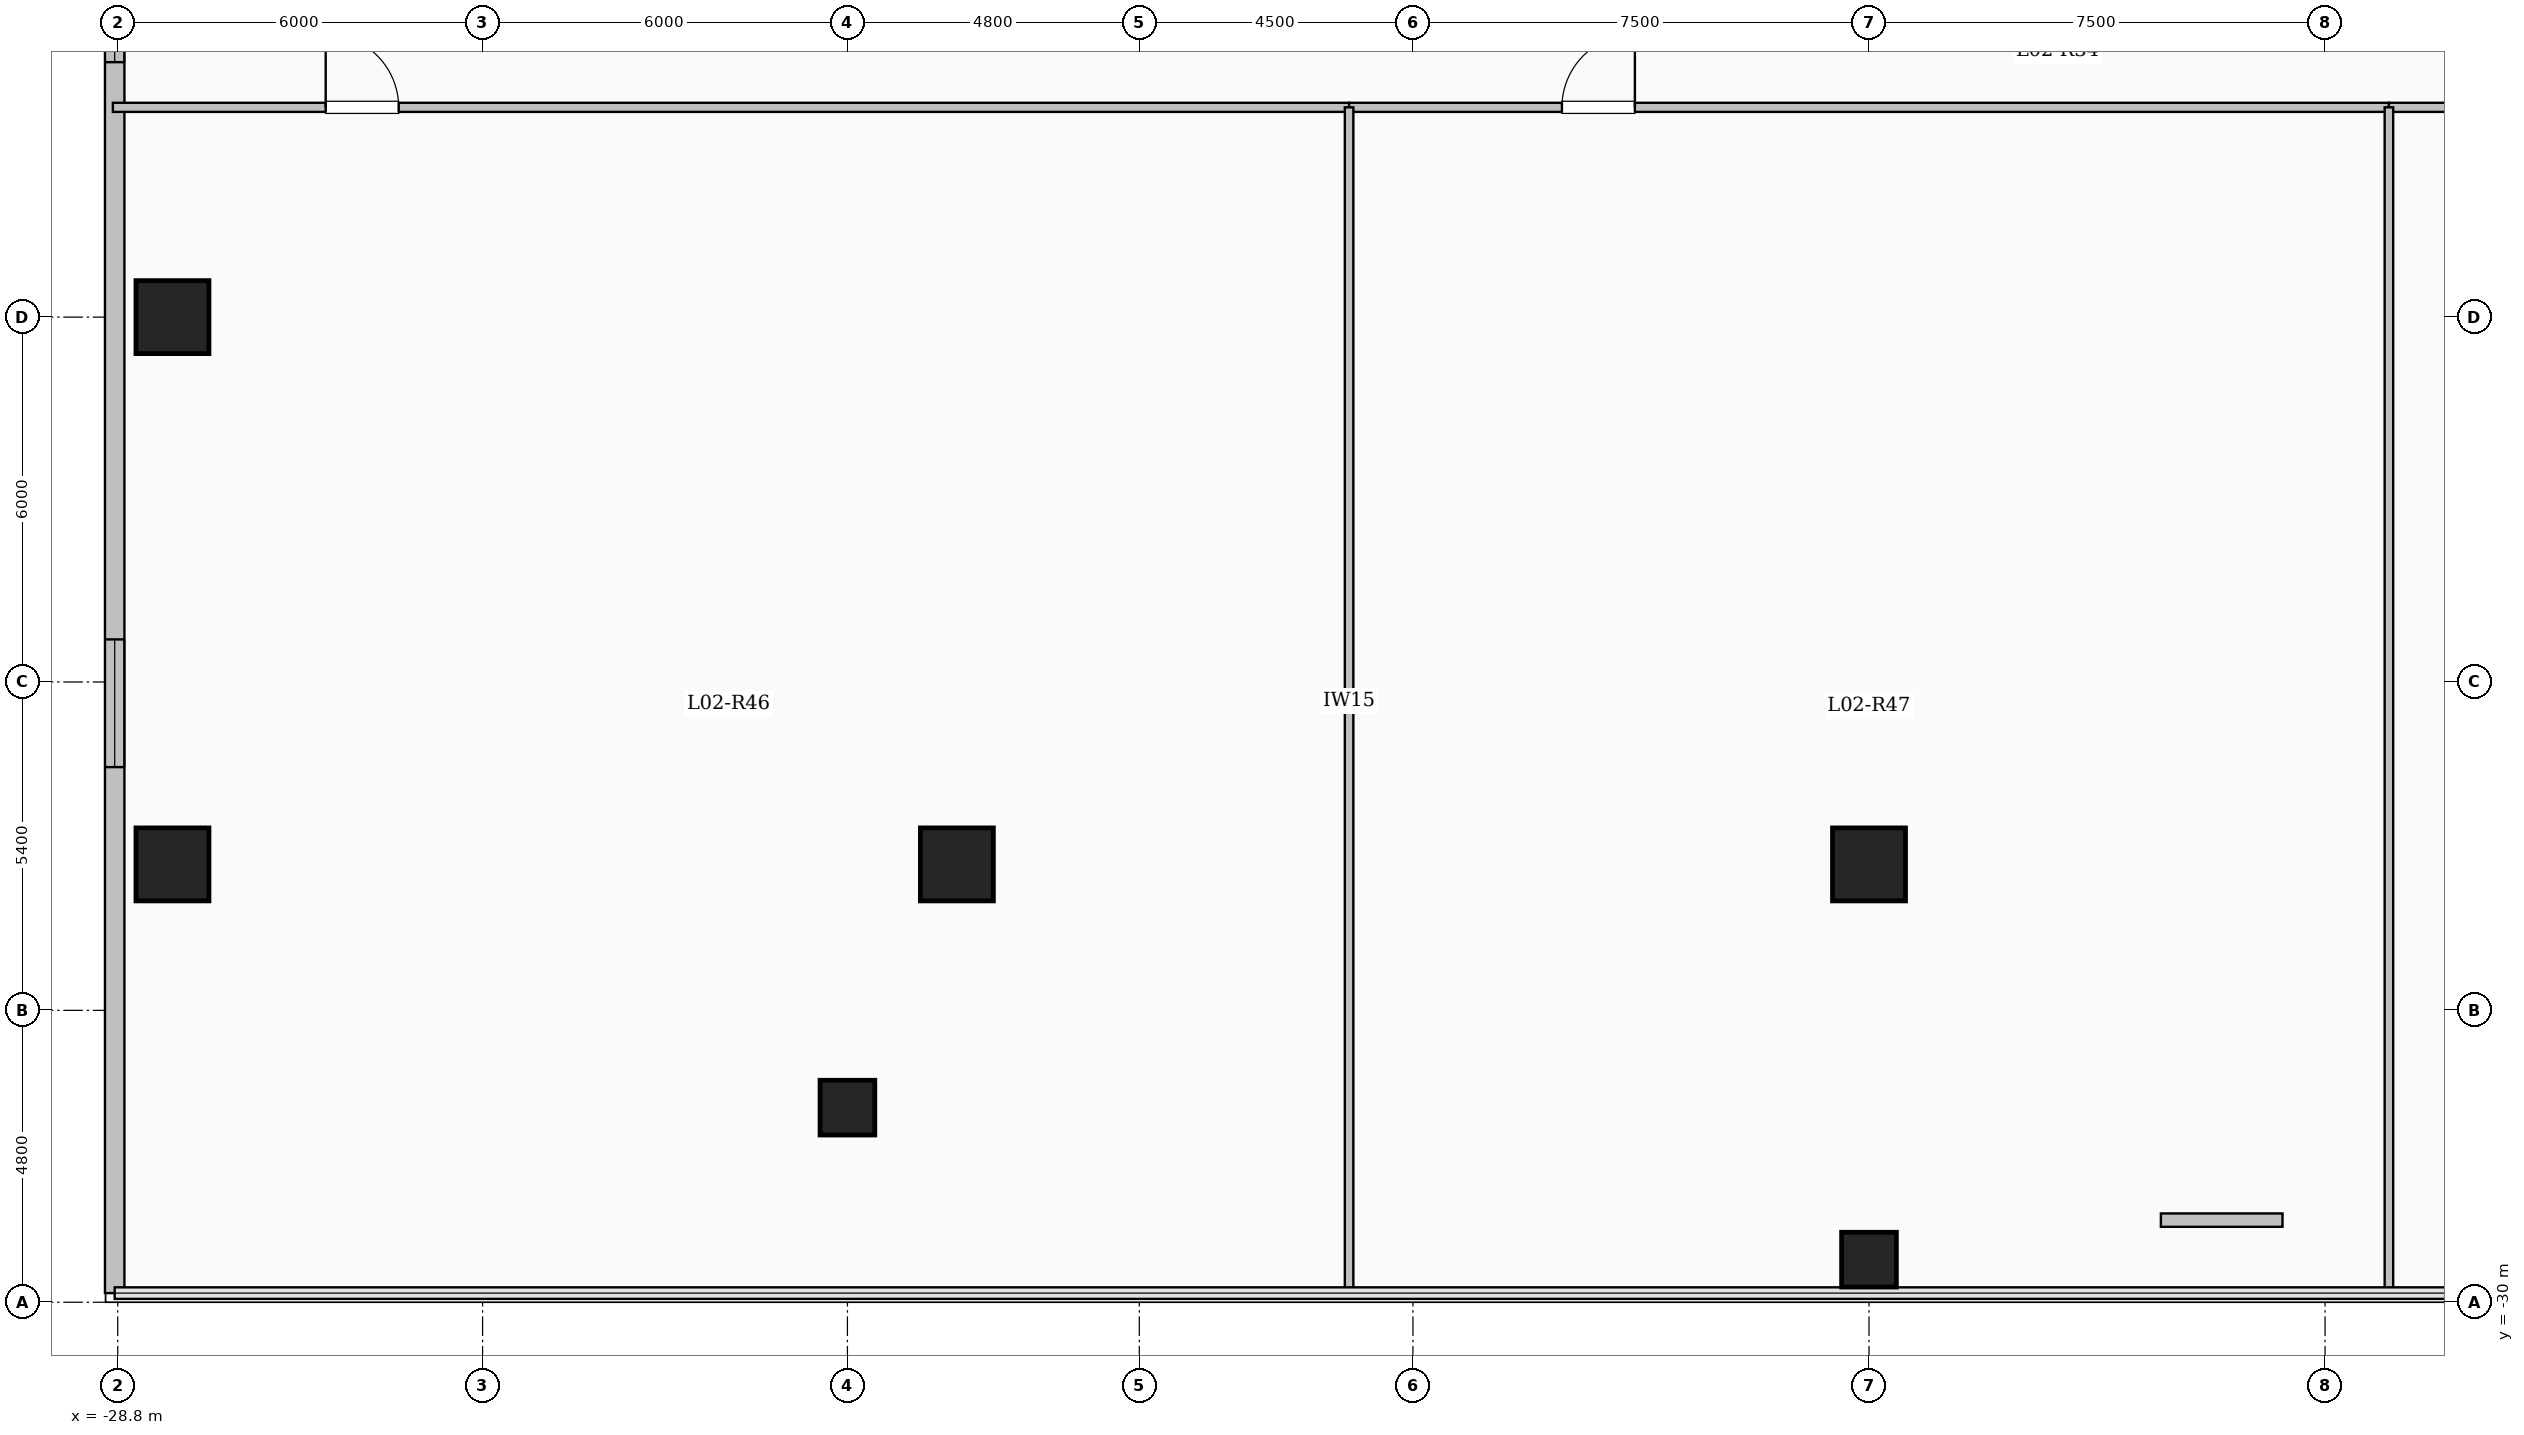
"""IFC4 building model, lengths in metres.
Left out: names, types, materials, properties, quantities, classifications, styles, units other than length and angle.
Written with IfcOpenShell. Run it as: python <this file> out.ifc"""

import sys

from ifc_helpers import new_model, si_unit, direction, frame, frame_2d, origin, origin_2d, place, context, subcontext, project, spatial, rectangle, extrude, element, fill, save


model = new_model("IFC4")
c1 = context("Model", 3, precision=1e-05, world=origin(), true_north=direction((0.0, 1.0)))
c2 = subcontext(c1, "Body", "Model", "MODEL_VIEW")
j1 = project(units=[si_unit("LENGTHUNIT", "METRE"), si_unit("PLANEANGLEUNIT", "RADIAN")], contexts=[c1])
p1 = place(None, origin())
s1 = spatial("IfcSite", under=j1, at=p1, CompositionType="ELEMENT")
p2 = place(p1, origin())
s2 = spatial("IfcBuilding", under=s1, at=p2, CompositionType="ELEMENT")
p3 = place(p2, frame((0.0, 0.0, 9.9)))
s3 = spatial("IfcBuildingStorey", under=s2, at=p3, CompositionType="ELEMENT", Elevation=9.9)
for number, where, z_axis, x_axis in (
    (1, (-16.8, -26.8, 0.0), (0.0, 0.0, 1.0), (1.0, 0.0, 0.0)),
    (2, (0.0, -29.3, 0.0), (0.0, 0.0, 1.0), (1.0, 0.0, 0.0)),
):
    element("IfcColumn", number, at=place(p3, frame(where, z_axis=z_axis, x_axis=x_axis)), inside=s3, PredefinedType="COLUMN", context=c2, shape_type="SweptSolid", body=[
        extrude(rectangle(XDim=0.9, YDim=0.9, at=origin_2d()), origin(), (0.0, 0.0, 1.0), 4.28),
    ])
for number, where, z_axis, x_axis in (
    (3, (-27.9, -22.8, 0.0), (0.0, 0.0, 1.0), (1.0, 0.0, 0.0)),
    (4, (-15.0, -22.8, 0.0), (0.0, 0.0, 1.0), (1.0, 0.0, 0.0)),
    (5, (0.0, -22.8, 0.0), (0.0, 0.0, 1.0), (1.0, 0.0, 0.0)),
    (6, (-27.9, -13.8, 0.0), (0.0, 0.0, 1.0), (1.0, 0.0, 0.0)),
):
    element("IfcColumn", number, at=place(p3, frame(where, z_axis=z_axis, x_axis=x_axis)), inside=s3, PredefinedType="COLUMN", context=c2, shape_type="SweptSolid", body=[
        extrude(rectangle(XDim=1.2, YDim=1.2, at=origin_2d()), origin(), (0.0, 0.0, 1.0), 4.5),
    ])
p4 = place(p3, frame((-28.85, -29.85, 0.0), z_axis=(0.0, 0.0, 1.0), x_axis=(0.0, 1.0, 0.0)))
e7 = element("IfcWall", 7, at=p4, inside=s3, PredefinedType="SOLIDWALL", context=c2, shape_type="SweptSolid", body=[
    extrude(rectangle(XDim=59.7, YDim=0.32, at=frame_2d((29.85, 0.0))), origin(), (0.0, 0.0, 1.0), 4.2),
])
p5 = place(p4, frame((8.65, 0.0, 0.9)))
e8 = element("IfcOpeningElement", 8, at=p5, cuts=e7, PredefinedType="OPENING", context=c2, shape_type="SweptSolid", body=[
    extrude(rectangle(XDim=2.1, YDim=2.0, at=frame_2d((1.05, 1.0))), frame((0.0, 0.17, 0.0), z_axis=(0.0, -1.0, 0.0), x_axis=(1.0, 0.0, 0.0)), (0.0, 0.0, 1.0), 0.34),
])
p6 = place(p4, frame((20.242, 0.0, 0.9)))
e9 = element("IfcOpeningElement", 9, at=p6, cuts=e7, PredefinedType="OPENING", context=c2, shape_type="SweptSolid", body=[
    extrude(rectangle(XDim=1.7, YDim=1.9, at=frame_2d((0.85, 0.95))), frame((0.0, 0.17, 0.0), z_axis=(0.0, -1.0, 0.0), x_axis=(1.0, 0.0, 0.0)), (0.0, 0.0, 1.0), 0.34),
])
p7 = place(p4, frame((30.55, 0.0, 0.9)))
e10 = element("IfcOpeningElement", 10, at=p7, cuts=e7, PredefinedType="OPENING", context=c2, shape_type="SweptSolid", body=[
    extrude(rectangle(XDim=2.1, YDim=2.0, at=frame_2d((1.05, 1.0))), frame((0.0, 0.17, 0.0), z_axis=(0.0, -1.0, 0.0), x_axis=(1.0, 0.0, 0.0)), (0.0, 0.0, 1.0), 0.34),
])
p8 = place(p4, frame((40.975, 0.0, 0.95)))
e11 = element("IfcOpeningElement", 11, at=p8, cuts=e7, PredefinedType="OPENING", context=c2, shape_type="SweptSolid", body=[
    extrude(rectangle(XDim=1.0, YDim=1.5, at=frame_2d((0.5, 0.75))), frame((0.0, 0.17, 0.0), z_axis=(0.0, -1.0, 0.0), x_axis=(1.0, 0.0, 0.0)), (0.0, 0.0, 1.0), 0.34),
])
p9 = place(p4, frame((50.0, 0.0, 0.9)))
e12 = element("IfcOpeningElement", 12, at=p9, cuts=e7, PredefinedType="OPENING", context=c2, shape_type="SweptSolid", body=[
    extrude(rectangle(XDim=2.1, YDim=2.0, at=frame_2d((1.05, 1.0))), frame((0.0, 0.17, 0.0), z_axis=(0.0, -1.0, 0.0), x_axis=(1.0, 0.0, 0.0)), (0.0, 0.0, 1.0), 0.34),
])
p10 = place(p3, frame((4.8, -28.65, 0.0), z_axis=(0.0, 0.0, 1.0), x_axis=(1.0, 0.0, 0.0)))
e13 = element("IfcWall", 13, at=p10, inside=s3, PredefinedType="PARAPET", context=c2, shape_type="SweptSolid", body=[
    extrude(rectangle(XDim=2.0, YDim=0.22, at=frame_2d((1.0, 0.0))), origin(), (0.0, 0.0, 1.0), 0.85),
])
p11 = place(p3, frame((-28.88, -10.35, 0.0), z_axis=(0.0, 0.0, 1.0), x_axis=(1.0, 0.0, 0.0)))
e14 = element("IfcWall", 14, at=p11, inside=s3, PredefinedType="PARTITIONING", context=c2, shape_type="SweptSolid", body=[
    extrude(rectangle(XDim=20.33, YDim=0.15, at=frame_2d((10.165, 0.0))), origin(), (0.0, 0.0, 1.0), 4.2),
])
p12 = place(p11, frame((3.5, 0.0, 0.0)))
e15 = element("IfcOpeningElement", 15, at=p12, cuts=e14, PredefinedType="OPENING", context=c2, shape_type="SweptSolid", body=[
    extrude(rectangle(XDim=1.2, YDim=2.15, at=frame_2d((0.6, 1.075))), frame((0.0, 0.085, 0.0), z_axis=(0.0, -1.0, 0.0), x_axis=(1.0, 0.0, 0.0)), (0.0, 0.0, 1.0), 0.17),
])
p13 = place(p3, frame((-8.55, -10.35, 0.0), z_axis=(0.0, 0.0, 1.0), x_axis=(1.0, 0.0, 0.0)))
e16 = element("IfcWall", 16, at=p13, inside=s3, PredefinedType="PARTITIONING", context=c2, shape_type="SweptSolid", body=[
    extrude(rectangle(XDim=17.1, YDim=0.15, at=frame_2d((8.55, 0.0))), origin(), (0.0, 0.0, 1.0), 4.2),
])
p14 = place(p13, frame((3.5, 0.0, 0.0)))
e17 = element("IfcOpeningElement", 17, at=p14, cuts=e16, PredefinedType="OPENING", context=c2, shape_type="SweptSolid", body=[
    extrude(rectangle(XDim=1.2, YDim=2.15, at=frame_2d((0.6, 1.075))), frame((0.0, 0.085, 0.0), z_axis=(0.0, -1.0, 0.0), x_axis=(1.0, 0.0, 0.0)), (0.0, 0.0, 1.0), 0.17),
])
p15 = place(p3, frame((8.55, -10.35, 0.0), z_axis=(0.0, 0.0, 1.0), x_axis=(1.0, 0.0, 0.0)))
e18 = element("IfcWall", 18, at=p15, inside=s3, PredefinedType="PARTITIONING", context=c2, shape_type="SweptSolid", body=[
    extrude(rectangle(XDim=20.33, YDim=0.15, at=frame_2d((10.165, 0.0))), origin(), (0.0, 0.0, 1.0), 4.2),
])
p16 = place(p15, frame((2.5, 0.0, 0.0)))
e19 = element("IfcOpeningElement", 19, at=p16, cuts=e18, PredefinedType="OPENING", context=c2, shape_type="SweptSolid", body=[
    extrude(rectangle(XDim=1.08, YDim=2.15, at=frame_2d((0.54, 1.075))), frame((0.0, 0.085, 0.0), z_axis=(0.0, -1.0, 0.0), x_axis=(1.0, 0.0, 0.0)), (0.0, 0.0, 1.0), 0.17),
])
for number, where, z_axis, x_axis in (
    (20, (-8.55, -29.88, 0.0), (0.0, 0.0, 1.0), (0.0, 1.0, 0.0)),
    (21, (8.55, -29.88, 0.0), (0.0, 0.0, 1.0), (0.0, 1.0, 0.0)),
):
    element("IfcWall", number, at=place(p3, frame(where, z_axis=z_axis, x_axis=x_axis)), inside=s3, PredefinedType="PARTITIONING", context=c2, shape_type="SweptSolid", body=[
        extrude(rectangle(XDim=19.53, YDim=0.14, at=frame_2d((9.765, 0.0))), origin(), (0.0, 0.0, 1.0), 4.2),
    ])
p17 = place(p5, origin())
e22 = element("IfcWindow", 22, at=p17, inside=s3, PartitioningType="SINGLE_PANEL", PredefinedType="WINDOW", context=c2, shape_type="SweptSolid", body=[
    extrude(rectangle(XDim=2.1, YDim=2.0, at=frame_2d((1.05, 1.0))), frame((0.0, 0.03, 0.0), z_axis=(0.0, -1.0, 0.0), x_axis=(1.0, 0.0, 0.0)), (0.0, 0.0, 1.0), 0.06),
])
fill(e8, e22)
p18 = place(p6, origin())
e23 = element("IfcWindow", 23, at=p18, inside=s3, PartitioningType="SINGLE_PANEL", PredefinedType="WINDOW", context=c2, shape_type="SweptSolid", body=[
    extrude(rectangle(XDim=1.7, YDim=1.9, at=frame_2d((0.85, 0.95))), frame((0.0, 0.03, 0.0), z_axis=(0.0, -1.0, 0.0), x_axis=(1.0, 0.0, 0.0)), (0.0, 0.0, 1.0), 0.06),
])
fill(e9, e23)
p19 = place(p12, origin())
e24 = element("IfcDoor", 24, at=p19, inside=s3, OperationType="SINGLE_SWING_LEFT", PredefinedType="DOOR", context=c2, shape_type="SweptSolid", body=[
    extrude(rectangle(XDim=1.2, YDim=2.15, at=frame_2d((0.6, 1.075))), frame((0.0, 0.025, 0.0), z_axis=(0.0, -1.0, 0.0), x_axis=(1.0, 0.0, 0.0)), (0.0, 0.0, 1.0), 0.05),
])
fill(e15, e24)
p20 = place(p14, origin())
e25 = element("IfcDoor", 25, at=p20, inside=s3, OperationType="SINGLE_SWING_RIGHT", PredefinedType="DOOR", context=c2, shape_type="SweptSolid", body=[
    extrude(rectangle(XDim=1.2, YDim=2.15, at=frame_2d((0.6, 1.075))), frame((0.0, 0.025, 0.0), z_axis=(0.0, -1.0, 0.0), x_axis=(1.0, 0.0, 0.0)), (0.0, 0.0, 1.0), 0.05),
])
fill(e17, e25)
save(model, sys.argv[1])
